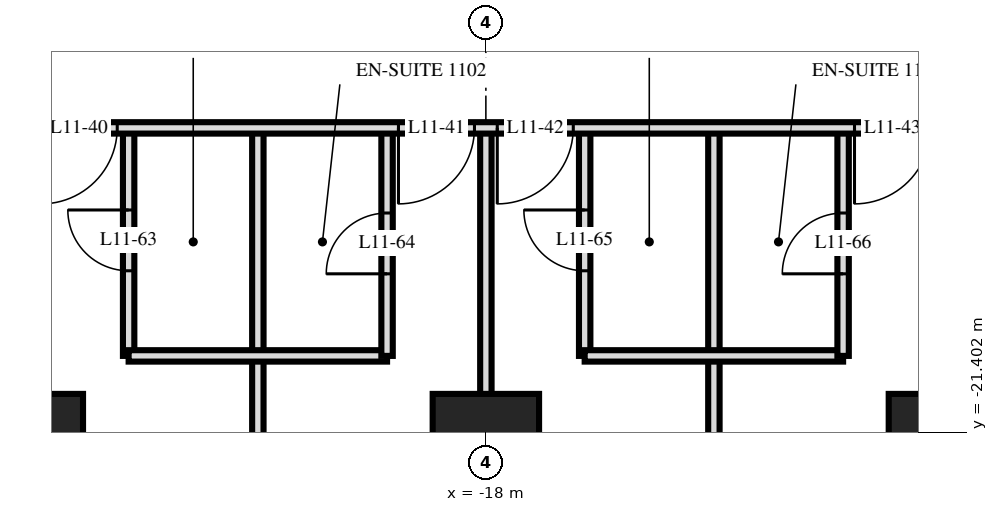
"""IFC4 building model, lengths in metres.
Left out: names, types, materials, properties, quantities, classifications, styles, units other than length and angle.
Written with IfcOpenShell. Run it as: python <this file> out.ifc"""

import sys

from ifc_helpers import new_model, si_unit, direction, frame, frame_2d, origin, origin_2d, place, context, subcontext, project, spatial, rectangle, extrude, element, fill, save


model = new_model("IFC4")
c1 = context("Model", 3, precision=1e-05, world=origin(), true_north=direction((0.0, 1.0)))
c2 = subcontext(c1, "Body", "Model", "MODEL_VIEW")
j1 = project(units=[si_unit("LENGTHUNIT", "METRE"), si_unit("PLANEANGLEUNIT", "RADIAN")], contexts=[c1])
p1 = place(None, origin())
s1 = spatial("IfcSite", under=j1, at=p1, CompositionType="ELEMENT")
p2 = place(p1, origin())
s2 = spatial("IfcBuilding", under=s1, at=p2, CompositionType="ELEMENT")
p3 = place(p2, frame((0.0, 0.0, 49.2)))
s3 = spatial("IfcBuildingStorey", under=s2, at=p3, CompositionType="ELEMENT", Elevation=49.2)
for number, where, z_axis, x_axis in (
    (1, (-24.0, -21.6, 0.0), (0.0, 0.0, 1.0), (1.0, 0.0, 0.0)),
    (2, (-18.0, -21.6, 0.0), (0.0, 0.0, 1.0), (1.0, 0.0, 0.0)),
    (3, (-12.0, -21.6, 0.0), (0.0, 0.0, 1.0), (1.0, 0.0, 0.0)),
):
    element("IfcColumn", number, at=place(p3, frame(where, z_axis=z_axis, x_axis=x_axis)), inside=s3, PredefinedType="COLUMN", context=c2, shape_type="SweptSolid", body=[
        extrude(rectangle(XDim=1.4, YDim=1.4, at=origin_2d()), origin(), (0.0, 0.0, 1.0), 3.6),
    ])
p4 = place(p3, frame((-13.3, -20.4, 0.0), z_axis=(0.0, 0.0, 1.0), x_axis=(0.0, 1.0, 0.0)))
e4 = element("IfcWall", 4, at=p4, inside=s3, PredefinedType="PARTITIONING", context=c2, shape_type="SweptSolid", body=[
    extrude(rectangle(XDim=3.0, YDim=0.15, at=frame_2d((1.5, 0.0))), origin(), (0.0, 0.0, 1.0), 3.32),
])
p5 = place(p4, frame((1.08, 0.0, 0.0)))
e5 = element("IfcOpeningElement", 5, at=p5, cuts=e4, PredefinedType="OPENING", context=c2, shape_type="SweptSolid", body=[
    extrude(rectangle(XDim=0.8, YDim=2.1, at=frame_2d((0.4, 1.05))), frame((0.0, 0.085, 0.0), z_axis=(0.0, -1.0, 0.0), x_axis=(1.0, 0.0, 0.0)), (0.0, 0.0, 1.0), 0.17),
])
p6 = place(p3, frame((-15.0, -29.22, 0.0), z_axis=(0.0, 0.0, 1.0), x_axis=(0.0, 1.0, 0.0)))
e6 = element("IfcWall", 6, at=p6, inside=s3, PredefinedType="PARTITIONING", context=c2, shape_type="SweptSolid", body=[
    extrude(rectangle(XDim=11.82, YDim=0.15, at=frame_2d((5.91, 0.0))), origin(), (0.0, 0.0, 1.0), 3.32),
])
p7 = place(p3, frame((-16.7, -20.4, 0.0), z_axis=(0.0, 0.0, 1.0), x_axis=(0.0, 1.0, 0.0)))
e7 = element("IfcWall", 7, at=p7, inside=s3, PredefinedType="PARTITIONING", context=c2, shape_type="SweptSolid", body=[
    extrude(rectangle(XDim=3.0, YDim=0.15, at=frame_2d((1.5, 0.0))), origin(), (0.0, 0.0, 1.0), 3.32),
])
p8 = place(p7, frame((1.12, 0.0, 0.0)))
e8 = element("IfcOpeningElement", 8, at=p8, cuts=e7, PredefinedType="OPENING", context=c2, shape_type="SweptSolid", body=[
    extrude(rectangle(XDim=0.8, YDim=2.1, at=frame_2d((0.4, 1.05))), frame((0.0, 0.085, 0.0), z_axis=(0.0, -1.0, 0.0), x_axis=(1.0, 0.0, 0.0)), (0.0, 0.0, 1.0), 0.17),
])
p9 = place(p3, frame((-18.0, -29.22, 0.0), z_axis=(0.0, 0.0, 1.0), x_axis=(0.0, 1.0, 0.0)))
e9 = element("IfcWall", 9, at=p9, inside=s3, PredefinedType="PARTITIONING", context=c2, shape_type="SweptSolid", body=[
    extrude(rectangle(XDim=11.82, YDim=0.15, at=frame_2d((5.91, 0.0))), origin(), (0.0, 0.0, 1.0), 3.32),
])
p10 = place(p3, frame((-19.3, -20.4, 0.0), z_axis=(0.0, 0.0, 1.0), x_axis=(0.0, 1.0, 0.0)))
e10 = element("IfcWall", 10, at=p10, inside=s3, PredefinedType="PARTITIONING", context=c2, shape_type="SweptSolid", body=[
    extrude(rectangle(XDim=3.0, YDim=0.15, at=frame_2d((1.5, 0.0))), origin(), (0.0, 0.0, 1.0), 3.32),
])
p11 = place(p10, frame((1.08, 0.0, 0.0)))
e11 = element("IfcOpeningElement", 11, at=p11, cuts=e10, PredefinedType="OPENING", context=c2, shape_type="SweptSolid", body=[
    extrude(rectangle(XDim=0.8, YDim=2.1, at=frame_2d((0.4, 1.05))), frame((0.0, 0.085, 0.0), z_axis=(0.0, -1.0, 0.0), x_axis=(1.0, 0.0, 0.0)), (0.0, 0.0, 1.0), 0.17),
])
p12 = place(p3, frame((-21.0, -29.22, 0.0), z_axis=(0.0, 0.0, 1.0), x_axis=(0.0, 1.0, 0.0)))
e12 = element("IfcWall", 12, at=p12, inside=s3, PredefinedType="PARTITIONING", context=c2, shape_type="SweptSolid", body=[
    extrude(rectangle(XDim=11.82, YDim=0.15, at=frame_2d((5.91, 0.0))), origin(), (0.0, 0.0, 1.0), 3.32),
])
p13 = place(p3, frame((-22.7, -20.4, 0.0), z_axis=(0.0, 0.0, 1.0), x_axis=(0.0, 1.0, 0.0)))
e13 = element("IfcWall", 13, at=p13, inside=s3, PredefinedType="PARTITIONING", context=c2, shape_type="SweptSolid", body=[
    extrude(rectangle(XDim=3.0, YDim=0.15, at=frame_2d((1.5, 0.0))), origin(), (0.0, 0.0, 1.0), 3.32),
])
p14 = place(p13, frame((1.12, 0.0, 0.0)))
e14 = element("IfcOpeningElement", 14, at=p14, cuts=e13, PredefinedType="OPENING", context=c2, shape_type="SweptSolid", body=[
    extrude(rectangle(XDim=0.8, YDim=2.1, at=frame_2d((0.4, 1.05))), frame((0.0, 0.085, 0.0), z_axis=(0.0, -1.0, 0.0), x_axis=(1.0, 0.0, 0.0)), (0.0, 0.0, 1.0), 0.17),
])
for number, where, z_axis, x_axis in (
    (15, (-22.7, -20.4, 0.0), (0.0, 0.0, 1.0), (1.0, 0.0, 0.0)),
    (16, (-16.7, -20.4, 0.0), (0.0, 0.0, 1.0), (1.0, 0.0, 0.0)),
):
    element("IfcWall", number, at=place(p3, frame(where, z_axis=z_axis, x_axis=x_axis)), inside=s3, PredefinedType="PARTITIONING", context=c2, shape_type="SweptSolid", body=[
        extrude(rectangle(XDim=3.4, YDim=0.15, at=frame_2d((1.7, 0.0))), origin(), (0.0, 0.0, 1.0), 3.32),
    ])
p15 = place(p3, frame((-33.12, -17.4, 0.0), z_axis=(0.0, 0.0, 1.0), x_axis=(1.0, 0.0, 0.0)))
e17 = element("IfcWall", 17, at=p15, inside=s3, PredefinedType="PARTITIONING", context=c2, shape_type="SweptSolid", body=[
    extrude(rectangle(XDim=66.24, YDim=0.15, at=frame_2d((33.12, 0.0))), origin(), (0.0, 0.0, 1.0), 3.32),
])
p16 = place(p15, frame((9.27, 0.0, 0.0)))
e18 = element("IfcOpeningElement", 18, at=p16, cuts=e17, PredefinedType="OPENING", context=c2, shape_type="SweptSolid", body=[
    extrude(rectangle(XDim=1.0, YDim=2.1, at=frame_2d((0.5, 1.05))), frame((0.0, 0.085, 0.0), z_axis=(0.0, -1.0, 0.0), x_axis=(1.0, 0.0, 0.0)), (0.0, 0.0, 1.0), 0.17),
])
p17 = place(p15, frame((13.97, 0.0, 0.0)))
e19 = element("IfcOpeningElement", 19, at=p17, cuts=e17, PredefinedType="OPENING", context=c2, shape_type="SweptSolid", body=[
    extrude(rectangle(XDim=1.0, YDim=2.1, at=frame_2d((0.5, 1.05))), frame((0.0, 0.085, 0.0), z_axis=(0.0, -1.0, 0.0), x_axis=(1.0, 0.0, 0.0)), (0.0, 0.0, 1.0), 0.17),
])
p18 = place(p15, frame((15.27, 0.0, 0.0)))
e20 = element("IfcOpeningElement", 20, at=p18, cuts=e17, PredefinedType="OPENING", context=c2, shape_type="SweptSolid", body=[
    extrude(rectangle(XDim=1.0, YDim=2.1, at=frame_2d((0.5, 1.05))), frame((0.0, 0.085, 0.0), z_axis=(0.0, -1.0, 0.0), x_axis=(1.0, 0.0, 0.0)), (0.0, 0.0, 1.0), 0.17),
])
p19 = place(p15, frame((19.97, 0.0, 0.0)))
e21 = element("IfcOpeningElement", 21, at=p19, cuts=e17, PredefinedType="OPENING", context=c2, shape_type="SweptSolid", body=[
    extrude(rectangle(XDim=1.0, YDim=2.1, at=frame_2d((0.5, 1.05))), frame((0.0, 0.085, 0.0), z_axis=(0.0, -1.0, 0.0), x_axis=(1.0, 0.0, 0.0)), (0.0, 0.0, 1.0), 0.17),
])
p20 = place(p15, frame((22.27, 0.0, 0.0)))
e22 = element("IfcOpeningElement", 22, at=p20, cuts=e17, PredefinedType="OPENING", context=c2, shape_type="SweptSolid", body=[
    extrude(rectangle(XDim=1.0, YDim=2.1, at=frame_2d((0.5, 1.05))), frame((0.0, 0.085, 0.0), z_axis=(0.0, -1.0, 0.0), x_axis=(1.0, 0.0, 0.0)), (0.0, 0.0, 1.0), 0.17),
])
p21 = place(p15, frame((28.97, 0.0, 0.0)))
e23 = element("IfcOpeningElement", 23, at=p21, cuts=e17, PredefinedType="OPENING", context=c2, shape_type="SweptSolid", body=[
    extrude(rectangle(XDim=1.0, YDim=2.1, at=frame_2d((0.5, 1.05))), frame((0.0, 0.085, 0.0), z_axis=(0.0, -1.0, 0.0), x_axis=(1.0, 0.0, 0.0)), (0.0, 0.0, 1.0), 0.17),
])
p22 = place(p15, frame((30.27, 0.0, 0.0)))
e24 = element("IfcOpeningElement", 24, at=p22, cuts=e17, PredefinedType="OPENING", context=c2, shape_type="SweptSolid", body=[
    extrude(rectangle(XDim=1.0, YDim=2.1, at=frame_2d((0.5, 1.05))), frame((0.0, 0.085, 0.0), z_axis=(0.0, -1.0, 0.0), x_axis=(1.0, 0.0, 0.0)), (0.0, 0.0, 1.0), 0.17),
])
p23 = place(p15, frame((34.97, 0.0, 0.0)))
e25 = element("IfcOpeningElement", 25, at=p23, cuts=e17, PredefinedType="OPENING", context=c2, shape_type="SweptSolid", body=[
    extrude(rectangle(XDim=1.0, YDim=2.1, at=frame_2d((0.5, 1.05))), frame((0.0, 0.085, 0.0), z_axis=(0.0, -1.0, 0.0), x_axis=(1.0, 0.0, 0.0)), (0.0, 0.0, 1.0), 0.17),
])
p24 = place(p15, frame((36.27, 0.0, 0.0)))
e26 = element("IfcOpeningElement", 26, at=p24, cuts=e17, PredefinedType="OPENING", context=c2, shape_type="SweptSolid", body=[
    extrude(rectangle(XDim=1.0, YDim=2.1, at=frame_2d((0.5, 1.05))), frame((0.0, 0.085, 0.0), z_axis=(0.0, -1.0, 0.0), x_axis=(1.0, 0.0, 0.0)), (0.0, 0.0, 1.0), 0.17),
])
p25 = place(p15, frame((39.82, 0.0, 0.0)))
e27 = element("IfcOpeningElement", 27, at=p25, cuts=e17, PredefinedType="OPENING", context=c2, shape_type="SweptSolid", body=[
    extrude(rectangle(XDim=1.0, YDim=2.1, at=frame_2d((0.5, 1.05))), frame((0.0, 0.085, 0.0), z_axis=(0.0, -1.0, 0.0), x_axis=(1.0, 0.0, 0.0)), (0.0, 0.0, 1.0), 0.17),
])
p26 = place(p15, frame((51.27, 0.0, 0.0)))
e28 = element("IfcOpeningElement", 28, at=p26, cuts=e17, PredefinedType="OPENING", context=c2, shape_type="SweptSolid", body=[
    extrude(rectangle(XDim=1.0, YDim=2.1, at=frame_2d((0.5, 1.05))), frame((0.0, 0.085, 0.0), z_axis=(0.0, -1.0, 0.0), x_axis=(1.0, 0.0, 0.0)), (0.0, 0.0, 1.0), 0.17),
])
p27 = place(p15, frame((4.42, 0.0, 0.0)))
e29 = element("IfcOpeningElement", 29, at=p27, cuts=e17, PredefinedType="OPENING", context=c2, shape_type="SweptSolid", body=[
    extrude(rectangle(XDim=1.0, YDim=2.1, at=frame_2d((0.5, 1.05))), frame((0.0, 0.085, 0.0), z_axis=(0.0, -1.0, 0.0), x_axis=(1.0, 0.0, 0.0)), (0.0, 0.0, 1.0), 0.17),
])
p28 = place(p15, frame((54.82, 0.0, 0.0)))
e30 = element("IfcOpeningElement", 30, at=p28, cuts=e17, PredefinedType="OPENING", context=c2, shape_type="SweptSolid", body=[
    extrude(rectangle(XDim=1.0, YDim=2.1, at=frame_2d((0.5, 1.05))), frame((0.0, 0.085, 0.0), z_axis=(0.0, -1.0, 0.0), x_axis=(1.0, 0.0, 0.0)), (0.0, 0.0, 1.0), 0.17),
])
p29 = place(p16, frame((0.5, 0.0, 0.0), z_axis=(0.0, 0.0, 1.0), x_axis=(-1.0, 0.0, 0.0)))
e31 = element("IfcDoor", 31, at=p29, inside=s3, OperationType="SINGLE_SWING_LEFT", PredefinedType="DOOR", context=c2, shape_type="SweptSolid", body=[
    extrude(rectangle(XDim=1.0, YDim=2.1, at=frame_2d((0.0, 1.05))), frame((0.0, -0.025, 0.0), z_axis=(0.0, 1.0, 0.0), x_axis=(-1.0, 0.0, 0.0)), (0.0, 0.0, 1.0), 0.05),
])
fill(e18, e31)
p30 = place(p17, frame((0.5, 0.0, 0.0), z_axis=(0.0, 0.0, 1.0), x_axis=(-1.0, 0.0, 0.0)))
e32 = element("IfcDoor", 32, at=p30, inside=s3, OperationType="SINGLE_SWING_LEFT", PredefinedType="DOOR", context=c2, shape_type="SweptSolid", body=[
    extrude(rectangle(XDim=1.0, YDim=2.1, at=frame_2d((0.0, 1.05))), frame((0.0, -0.025, 0.0), z_axis=(0.0, 1.0, 0.0), x_axis=(-1.0, 0.0, 0.0)), (0.0, 0.0, 1.0), 0.05),
])
fill(e19, e32)
p31 = place(p18, frame((0.5, 0.0, 0.0), z_axis=(0.0, 0.0, 1.0), x_axis=(-1.0, 0.0, 0.0)))
e33 = element("IfcDoor", 33, at=p31, inside=s3, OperationType="SINGLE_SWING_LEFT", PredefinedType="DOOR", context=c2, shape_type="SweptSolid", body=[
    extrude(rectangle(XDim=1.0, YDim=2.1, at=frame_2d((0.0, 1.05))), frame((0.0, -0.025, 0.0), z_axis=(0.0, 1.0, 0.0), x_axis=(-1.0, 0.0, 0.0)), (0.0, 0.0, 1.0), 0.05),
])
fill(e20, e33)
p32 = place(p19, frame((0.5, 0.0, 0.0), z_axis=(0.0, 0.0, 1.0), x_axis=(-1.0, 0.0, 0.0)))
e34 = element("IfcDoor", 34, at=p32, inside=s3, OperationType="SINGLE_SWING_LEFT", PredefinedType="DOOR", context=c2, shape_type="SweptSolid", body=[
    extrude(rectangle(XDim=1.0, YDim=2.1, at=frame_2d((0.0, 1.05))), frame((0.0, -0.025, 0.0), z_axis=(0.0, 1.0, 0.0), x_axis=(-1.0, 0.0, 0.0)), (0.0, 0.0, 1.0), 0.05),
])
fill(e21, e34)
p33 = place(p14, origin())
e35 = element("IfcDoor", 35, at=p33, inside=s3, OperationType="SINGLE_SWING_LEFT", PredefinedType="DOOR", context=c2, shape_type="SweptSolid", body=[
    extrude(rectangle(XDim=0.8, YDim=2.1, at=frame_2d((0.4, 1.05))), frame((0.0, 0.025, 0.0), z_axis=(0.0, -1.0, 0.0), x_axis=(1.0, 0.0, 0.0)), (0.0, 0.0, 1.0), 0.05),
])
fill(e14, e35)
p34 = place(p11, origin())
e36 = element("IfcDoor", 36, at=p34, inside=s3, OperationType="SINGLE_SWING_RIGHT", PredefinedType="DOOR", context=c2, shape_type="SweptSolid", body=[
    extrude(rectangle(XDim=0.8, YDim=2.1, at=frame_2d((0.4, 1.05))), frame((0.0, 0.025, 0.0), z_axis=(0.0, -1.0, 0.0), x_axis=(1.0, 0.0, 0.0)), (0.0, 0.0, 1.0), 0.05),
])
fill(e11, e36)
p35 = place(p8, origin())
e37 = element("IfcDoor", 37, at=p35, inside=s3, OperationType="SINGLE_SWING_LEFT", PredefinedType="DOOR", context=c2, shape_type="SweptSolid", body=[
    extrude(rectangle(XDim=0.8, YDim=2.1, at=frame_2d((0.4, 1.05))), frame((0.0, 0.025, 0.0), z_axis=(0.0, -1.0, 0.0), x_axis=(1.0, 0.0, 0.0)), (0.0, 0.0, 1.0), 0.05),
])
fill(e8, e37)
p36 = place(p5, origin())
e38 = element("IfcDoor", 38, at=p36, inside=s3, OperationType="SINGLE_SWING_RIGHT", PredefinedType="DOOR", context=c2, shape_type="SweptSolid", body=[
    extrude(rectangle(XDim=0.8, YDim=2.1, at=frame_2d((0.4, 1.05))), frame((0.0, 0.025, 0.0), z_axis=(0.0, -1.0, 0.0), x_axis=(1.0, 0.0, 0.0)), (0.0, 0.0, 1.0), 0.05),
])
fill(e5, e38)
save(model, sys.argv[1])
